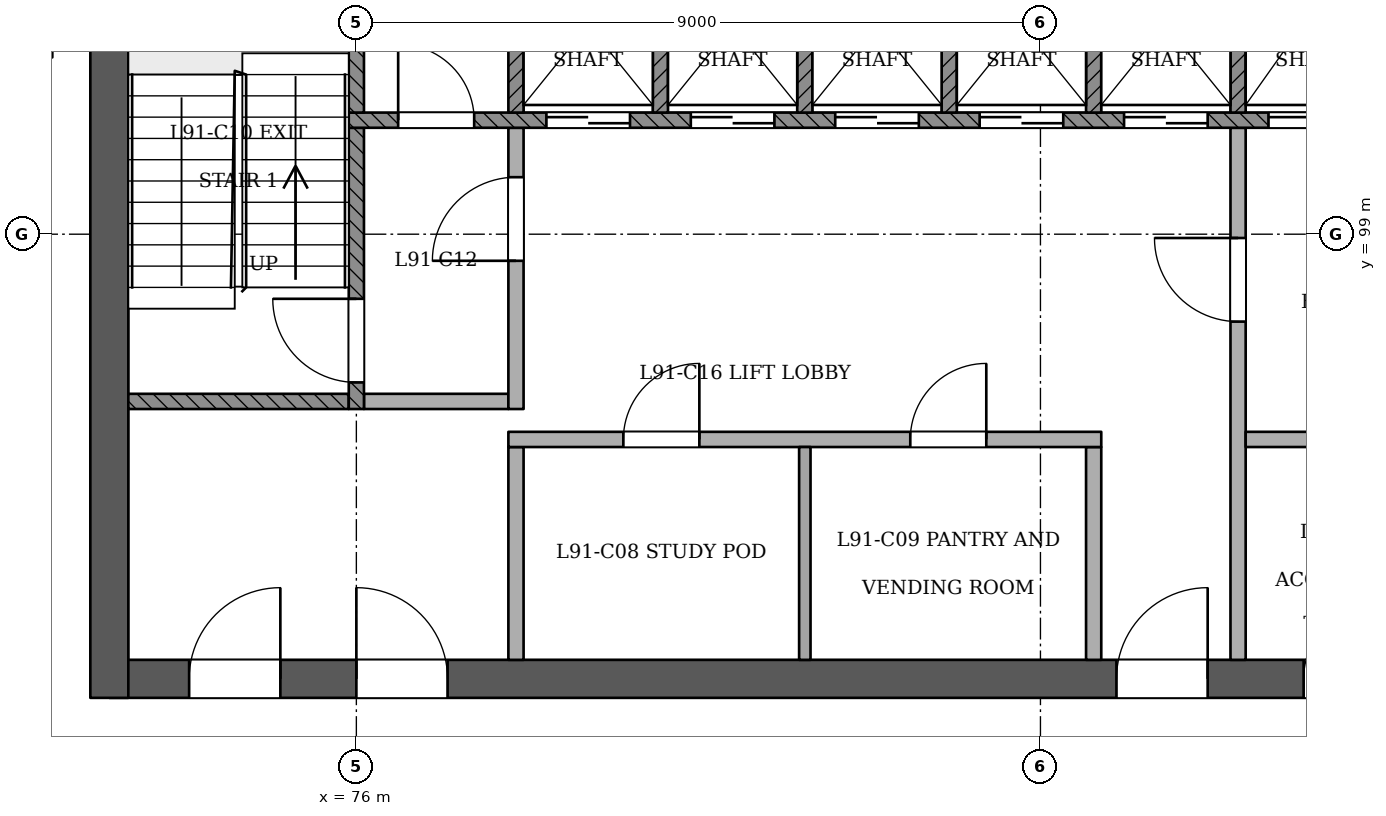
"""IFC4 building model, lengths in metres.
Left out: names, types, materials, properties, quantities, classifications, styles, units other than length and angle.
Written with IfcOpenShell. Run it as: python <this file> out.ifc"""

import sys

from ifc_helpers import new_model, si_unit, direction, frame, frame_2d, origin, place, context, subcontext, project, spatial, rectangle, extrude, element, fill, save


model = new_model("IFC4")
c1 = context("Model", 3, precision=1e-05, world=origin(), true_north=direction((0.0, 1.0)))
c2 = subcontext(c1, "Body", "Model", "MODEL_VIEW")
j1 = project(units=[si_unit("LENGTHUNIT", "METRE"), si_unit("PLANEANGLEUNIT", "RADIAN")], contexts=[c1])
p1 = place(None, origin())
s1 = spatial("IfcSite", under=j1, at=p1, CompositionType="ELEMENT")
p2 = place(p1, origin())
s2 = spatial("IfcBuilding", under=s1, at=p2, CompositionType="ELEMENT")
p3 = place(p2, frame((0.0, 0.0, 350.8)))
s3 = spatial("IfcBuildingStorey", under=s2, at=p3, CompositionType="ELEMENT", Elevation=350.8)
p4 = place(p3, frame((72.75, 93.15, 0.0), z_axis=(0.0, 0.0, 1.0), x_axis=(1.0, 0.0, 0.0)))
e1 = element("IfcWall", 1, at=p4, inside=s3, PredefinedType="SHEAR", context=c2, shape_type="SweptSolid", body=[
    extrude(rectangle(XDim=24.75, YDim=0.5, at=frame_2d((12.375, 0.0))), origin(), (0.0, 0.0, 1.0), 3.6),
])
p5 = place(p4, frame((1.05, 0.0, 0.0)))
e2 = element("IfcOpeningElement", 2, at=p5, cuts=e1, PredefinedType="OPENING", context=c2, shape_type="SweptSolid", body=[
    extrude(rectangle(XDim=1.2, YDim=2.1, at=frame_2d((0.6, 1.05))), frame((0.0, 0.26, 0.0), z_axis=(0.0, -1.0, 0.0), x_axis=(1.0, 0.0, 0.0)), (0.0, 0.0, 1.0), 0.521),
])
p6 = place(p4, frame((3.25, 0.0, 0.0)))
e3 = element("IfcOpeningElement", 3, at=p6, cuts=e1, PredefinedType="OPENING", context=c2, shape_type="SweptSolid", body=[
    extrude(rectangle(XDim=1.2, YDim=2.1, at=frame_2d((0.6, 1.05))), frame((0.0, 0.26, 0.0), z_axis=(0.0, -1.0, 0.0), x_axis=(1.0, 0.0, 0.0)), (0.0, 0.0, 1.0), 0.521),
])
p7 = place(p4, frame((13.25, 0.0, 0.0)))
e4 = element("IfcOpeningElement", 4, at=p7, cuts=e1, PredefinedType="OPENING", context=c2, shape_type="SweptSolid", body=[
    extrude(rectangle(XDim=1.2, YDim=2.1, at=frame_2d((0.6, 1.05))), frame((0.0, 0.26, 0.0), z_axis=(0.0, -1.0, 0.0), x_axis=(1.0, 0.0, 0.0)), (0.0, 0.0, 1.0), 0.521),
])
p8 = place(p4, frame((15.712, 0.0, 0.0)))
e5 = element("IfcOpeningElement", 5, at=p8, cuts=e1, PredefinedType="OPENING", context=c2, shape_type="SweptSolid", body=[
    extrude(rectangle(XDim=1.0, YDim=2.1, at=frame_2d((0.5, 1.05))), frame((0.0, 0.26, 0.0), z_axis=(0.0, -1.0, 0.0), x_axis=(1.0, 0.0, 0.0)), (0.0, 0.0, 1.0), 0.521),
])
p9 = place(p4, frame((18.15, 0.0, 0.0)))
e6 = element("IfcOpeningElement", 6, at=p9, cuts=e1, PredefinedType="OPENING", context=c2, shape_type="SweptSolid", body=[
    extrude(rectangle(XDim=1.0, YDim=2.1, at=frame_2d((0.5, 1.05))), frame((0.0, 0.26, 0.0), z_axis=(0.0, -1.0, 0.0), x_axis=(1.0, 0.0, 0.0)), (0.0, 0.0, 1.0), 0.521),
])
p10 = place(p4, frame((20.5, 0.0, 0.0)))
e7 = element("IfcOpeningElement", 7, at=p10, cuts=e1, PredefinedType="OPENING", context=c2, shape_type="SweptSolid", body=[
    extrude(rectangle(XDim=1.0, YDim=2.1, at=frame_2d((0.5, 1.05))), frame((0.0, 0.26, 0.0), z_axis=(0.0, -1.0, 0.0), x_axis=(1.0, 0.0, 0.0)), (0.0, 0.0, 1.0), 0.521),
])
p11 = place(p4, frame((22.788, 0.0, 0.0)))
e8 = element("IfcOpeningElement", 8, at=p11, cuts=e1, PredefinedType="OPENING", context=c2, shape_type="SweptSolid", body=[
    extrude(rectangle(XDim=1.0, YDim=2.1, at=frame_2d((0.5, 1.05))), frame((0.0, 0.26, 0.0), z_axis=(0.0, -1.0, 0.0), x_axis=(1.0, 0.0, 0.0)), (0.0, 0.0, 1.0), 0.521),
])
p12 = place(p3, frame((72.75, 103.65, 0.0), z_axis=(0.0, 0.0, 1.0), x_axis=(0.0, -1.0, 0.0)))
e9 = element("IfcWall", 9, at=p12, inside=s3, PredefinedType="SHEAR", context=c2, shape_type="SweptSolid", body=[
    extrude(rectangle(XDim=10.75, YDim=0.5, at=frame_2d((5.375, 0.0))), origin(), (0.0, 0.0, 1.0), 3.6),
])
p13 = place(p3, frame((78.1, 93.4, 0.0), z_axis=(0.0, 0.0, 1.0), x_axis=(0.0, 1.0, 0.0)))
e10 = element("IfcWall", 10, at=p13, inside=s3, PredefinedType="PARTITIONING", context=c2, shape_type="SweptSolid", body=[
    extrude(rectangle(XDim=2.8, YDim=0.2, at=frame_2d((1.4, 0.0))), origin(), (0.0, 0.0, 1.0), 3.2),
])
p14 = place(p3, frame((81.9, 93.4, 0.0), z_axis=(0.0, 0.0, 1.0), x_axis=(0.0, 1.0, 0.0)))
e11 = element("IfcWall", 11, at=p14, inside=s3, PredefinedType="PARTITIONING", context=c2, shape_type="SweptSolid", body=[
    extrude(rectangle(XDim=2.8, YDim=0.15, at=frame_2d((1.4, 0.0))), origin(), (0.0, 0.0, 1.0), 3.2),
])
p15 = place(p3, frame((85.7, 93.4, 0.0), z_axis=(0.0, 0.0, 1.0), x_axis=(0.0, 1.0, 0.0)))
e12 = element("IfcWall", 12, at=p15, inside=s3, PredefinedType="PARTITIONING", context=c2, shape_type="SweptSolid", body=[
    extrude(rectangle(XDim=2.8, YDim=0.2, at=frame_2d((1.4, 0.0))), origin(), (0.0, 0.0, 1.0), 3.2),
])
p16 = place(p3, frame((87.6, 93.4, 0.0), z_axis=(0.0, 0.0, 1.0), x_axis=(0.0, 1.0, 0.0)))
e13 = element("IfcWall", 13, at=p16, inside=s3, PredefinedType="PARTITIONING", context=c2, shape_type="SweptSolid", body=[
    extrude(rectangle(XDim=7.0, YDim=0.2, at=frame_2d((3.5, 0.0))), origin(), (0.0, 0.0, 1.0), 3.2),
])
p17 = place(p16, frame((4.45, 0.0, 0.0)))
e14 = element("IfcOpeningElement", 14, at=p17, cuts=e13, PredefinedType="OPENING", context=c2, shape_type="SweptSolid", body=[
    extrude(rectangle(XDim=1.1, YDim=2.1, at=frame_2d((0.55, 1.05))), frame((0.0, 0.11, 0.0), z_axis=(0.0, -1.0, 0.0), x_axis=(1.0, 0.0, 0.0)), (0.0, 0.0, 1.0), 0.221),
])
p18 = place(p3, frame((78.0, 96.3, 0.0), z_axis=(0.0, 0.0, 1.0), x_axis=(1.0, 0.0, 0.0)))
e15 = element("IfcWall", 15, at=p18, inside=s3, PredefinedType="PARTITIONING", context=c2, shape_type="SweptSolid", body=[
    extrude(rectangle(XDim=7.8, YDim=0.2, at=frame_2d((3.9, 0.0))), origin(), (0.0, 0.0, 1.0), 3.2),
])
p19 = place(p18, frame((1.512, 0.0, 0.0)))
e16 = element("IfcOpeningElement", 16, at=p19, cuts=e15, PredefinedType="OPENING", context=c2, shape_type="SweptSolid", body=[
    extrude(rectangle(XDim=1.0, YDim=2.1, at=frame_2d((0.5, 1.05))), frame((0.0, 0.11, 0.0), z_axis=(0.0, -1.0, 0.0), x_axis=(1.0, 0.0, 0.0)), (0.0, 0.0, 1.0), 0.221),
])
p20 = place(p18, frame((5.288, 0.0, 0.0)))
e17 = element("IfcOpeningElement", 17, at=p20, cuts=e15, PredefinedType="OPENING", context=c2, shape_type="SweptSolid", body=[
    extrude(rectangle(XDim=1.0, YDim=2.1, at=frame_2d((0.5, 1.05))), frame((0.0, 0.11, 0.0), z_axis=(0.0, -1.0, 0.0), x_axis=(1.0, 0.0, 0.0)), (0.0, 0.0, 1.0), 0.221),
])
p21 = place(p3, frame((87.7, 96.3, 0.0), z_axis=(0.0, 0.0, 1.0), x_axis=(1.0, 0.0, 0.0)))
e18 = element("IfcWall", 18, at=p21, inside=s3, PredefinedType="PARTITIONING", context=c2, shape_type="SweptSolid", body=[
    extrude(rectangle(XDim=3.6, YDim=0.2, at=frame_2d((1.8, 0.0))), origin(), (0.0, 0.0, 1.0), 3.2),
])
p22 = place(p3, frame((73.0, 96.8, 0.0), z_axis=(0.0, 0.0, 1.0), x_axis=(1.0, 0.0, 0.0)))
e19 = element("IfcWall", 19, at=p22, inside=s3, PredefinedType="SOLIDWALL", context=c2, shape_type="SweptSolid", body=[
    extrude(rectangle(XDim=2.9, YDim=0.2, at=frame_2d((1.45, 0.0))), origin(), (0.0, 0.0, 1.0), 3.2),
])
p23 = place(p3, frame((76.0, 96.7, 0.0), z_axis=(0.0, 0.0, 1.0), x_axis=(0.0, 1.0, 0.0)))
e20 = element("IfcWall", 20, at=p23, inside=s3, PredefinedType="SOLIDWALL", context=c2, shape_type="SweptSolid", body=[
    extrude(rectangle(XDim=3.7, YDim=0.2, at=frame_2d((1.85, 0.0))), origin(), (0.0, 0.0, 1.0), 3.2),
])
p24 = place(p23, frame((0.35, 0.0, 0.0)))
e21 = element("IfcOpeningElement", 21, at=p24, cuts=e20, PredefinedType="OPENING", context=c2, shape_type="SweptSolid", body=[
    extrude(rectangle(XDim=1.1, YDim=2.1, at=frame_2d((0.55, 1.05))), frame((0.0, 0.11, 0.0), z_axis=(0.0, -1.0, 0.0), x_axis=(1.0, 0.0, 0.0)), (0.0, 0.0, 1.0), 0.221),
])
p25 = place(p3, frame((76.1, 96.8, 0.0), z_axis=(0.0, 0.0, 1.0), x_axis=(1.0, 0.0, 0.0)))
e22 = element("IfcWall", 22, at=p25, inside=s3, PredefinedType="PARTITIONING", context=c2, shape_type="SweptSolid", body=[
    extrude(rectangle(XDim=1.9, YDim=0.2, at=frame_2d((0.95, 0.0))), origin(), (0.0, 0.0, 1.0), 3.2),
])
p26 = place(p3, frame((78.1, 96.7, 0.0), z_axis=(0.0, 0.0, 1.0), x_axis=(0.0, 1.0, 0.0)))
e23 = element("IfcWall", 23, at=p26, inside=s3, PredefinedType="PARTITIONING", context=c2, shape_type="SweptSolid", body=[
    extrude(rectangle(XDim=3.7, YDim=0.2, at=frame_2d((1.85, 0.0))), origin(), (0.0, 0.0, 1.0), 3.2),
])
p27 = place(p26, frame((1.95, 0.0, 0.0)))
e24 = element("IfcOpeningElement", 24, at=p27, cuts=e23, PredefinedType="OPENING", context=c2, shape_type="SweptSolid", body=[
    extrude(rectangle(XDim=1.1, YDim=2.1, at=frame_2d((0.55, 1.05))), frame((0.0, 0.11, 0.0), z_axis=(0.0, -1.0, 0.0), x_axis=(1.0, 0.0, 0.0)), (0.0, 0.0, 1.0), 0.221),
])
p28 = place(p3, frame((75.9, 100.5, 0.0), z_axis=(0.0, 0.0, 1.0), x_axis=(1.0, 0.0, 0.0)))
e25 = element("IfcWall", 25, at=p28, inside=s3, PredefinedType="SOLIDWALL", context=c2, shape_type="SweptSolid", body=[
    extrude(rectangle(XDim=18.2, YDim=0.2, at=frame_2d((9.1, 0.0))), origin(), (0.0, 0.0, 1.0), 3.2),
])
p29 = place(p28, frame((2.6, 0.0, 0.0)))
e26 = element("IfcOpeningElement", 26, at=p29, cuts=e25, PredefinedType="OPENING", context=c2, shape_type="SweptSolid", body=[
    extrude(rectangle(XDim=1.1, YDim=2.1, at=frame_2d((0.55, 1.05))), frame((0.0, 0.11, 0.0), z_axis=(0.0, -1.0, 0.0), x_axis=(1.0, 0.0, 0.0)), (0.0, 0.0, 1.0), 0.221),
])
p30 = place(p28, frame((4.5, 0.0, 0.0)))
e27 = element("IfcOpeningElement", 27, at=p30, cuts=e25, PredefinedType="OPENING", context=c2, shape_type="SweptSolid", body=[
    extrude(rectangle(XDim=1.1, YDim=2.1, at=frame_2d((0.55, 1.05))), frame((0.0, 0.11, 0.0), z_axis=(0.0, -1.0, 0.0), x_axis=(1.0, 0.0, 0.0)), (0.0, 0.0, 1.0), 0.221),
])
p31 = place(p28, frame((6.4, 0.0, 0.0)))
e28 = element("IfcOpeningElement", 28, at=p31, cuts=e25, PredefinedType="OPENING", context=c2, shape_type="SweptSolid", body=[
    extrude(rectangle(XDim=1.1, YDim=2.1, at=frame_2d((0.55, 1.05))), frame((0.0, 0.11, 0.0), z_axis=(0.0, -1.0, 0.0), x_axis=(1.0, 0.0, 0.0)), (0.0, 0.0, 1.0), 0.221),
])
p32 = place(p28, frame((8.3, 0.0, 0.0)))
e29 = element("IfcOpeningElement", 29, at=p32, cuts=e25, PredefinedType="OPENING", context=c2, shape_type="SweptSolid", body=[
    extrude(rectangle(XDim=1.1, YDim=2.1, at=frame_2d((0.55, 1.05))), frame((0.0, 0.11, 0.0), z_axis=(0.0, -1.0, 0.0), x_axis=(1.0, 0.0, 0.0)), (0.0, 0.0, 1.0), 0.221),
])
p33 = place(p28, frame((10.2, 0.0, 0.0)))
e30 = element("IfcOpeningElement", 30, at=p33, cuts=e25, PredefinedType="OPENING", context=c2, shape_type="SweptSolid", body=[
    extrude(rectangle(XDim=1.1, YDim=2.1, at=frame_2d((0.55, 1.05))), frame((0.0, 0.11, 0.0), z_axis=(0.0, -1.0, 0.0), x_axis=(1.0, 0.0, 0.0)), (0.0, 0.0, 1.0), 0.221),
])
p34 = place(p28, frame((12.1, 0.0, 0.0)))
e31 = element("IfcOpeningElement", 31, at=p34, cuts=e25, PredefinedType="OPENING", context=c2, shape_type="SweptSolid", body=[
    extrude(rectangle(XDim=1.1, YDim=2.1, at=frame_2d((0.55, 1.05))), frame((0.0, 0.11, 0.0), z_axis=(0.0, -1.0, 0.0), x_axis=(1.0, 0.0, 0.0)), (0.0, 0.0, 1.0), 0.221),
])
p35 = place(p28, frame((14.0, 0.0, 0.0)))
e32 = element("IfcOpeningElement", 32, at=p35, cuts=e25, PredefinedType="OPENING", context=c2, shape_type="SweptSolid", body=[
    extrude(rectangle(XDim=1.1, YDim=2.1, at=frame_2d((0.55, 1.05))), frame((0.0, 0.11, 0.0), z_axis=(0.0, -1.0, 0.0), x_axis=(1.0, 0.0, 0.0)), (0.0, 0.0, 1.0), 0.221),
])
p36 = place(p28, frame((0.65, 0.0, 0.0)))
e33 = element("IfcOpeningElement", 33, at=p36, cuts=e25, PredefinedType="OPENING", context=c2, shape_type="SweptSolid", body=[
    extrude(rectangle(XDim=1.0, YDim=2.1, at=frame_2d((0.5, 1.05))), frame((0.0, 0.11, 0.0), z_axis=(0.0, -1.0, 0.0), x_axis=(1.0, 0.0, 0.0)), (0.0, 0.0, 1.0), 0.221),
])
p37 = place(p28, frame((16.3, 0.0, 0.0)))
e34 = element("IfcOpeningElement", 34, at=p37, cuts=e25, PredefinedType="OPENING", context=c2, shape_type="SweptSolid", body=[
    extrude(rectangle(XDim=1.0, YDim=2.1, at=frame_2d((0.5, 1.05))), frame((0.0, 0.11, 0.0), z_axis=(0.0, -1.0, 0.0), x_axis=(1.0, 0.0, 0.0)), (0.0, 0.0, 1.0), 0.221),
])
for number, where, z_axis, x_axis in (
    (35, (76.0, 100.6, 0.0), (0.0, 0.0, 1.0), (0.0, 1.0, 0.0)),
    (36, (78.1, 100.6, 0.0), (0.0, 0.0, 1.0), (0.0, 1.0, 0.0)),
    (37, (80.0, 100.6, 0.0), (0.0, 0.0, 1.0), (0.0, 1.0, 0.0)),
    (38, (81.9, 100.6, 0.0), (0.0, 0.0, 1.0), (0.0, 1.0, 0.0)),
    (39, (83.8, 100.6, 0.0), (0.0, 0.0, 1.0), (0.0, 1.0, 0.0)),
    (40, (85.7, 100.6, 0.0), (0.0, 0.0, 1.0), (0.0, 1.0, 0.0)),
    (41, (87.6, 100.6, 0.0), (0.0, 0.0, 1.0), (0.0, 1.0, 0.0)),
):
    element("IfcWall", number, at=place(p3, frame(where, z_axis=z_axis, x_axis=x_axis)), inside=s3, PredefinedType="SOLIDWALL", context=c2, shape_type="SweptSolid", body=[
        extrude(rectangle(XDim=2.8, YDim=0.2, at=frame_2d((1.4, 0.0))), origin(), (0.0, 0.0, 1.0), 3.2),
    ])
p38 = place(p29, origin())
e42 = element("IfcDoor", 42, at=p38, inside=s3, OperationType="SLIDING_TO_RIGHT", PredefinedType="NOTDEFINED", context=c2, shape_type="SweptSolid", body=[
    extrude(rectangle(XDim=1.1, YDim=2.1, at=frame_2d((0.55, 1.05))), frame((0.0, 0.025, 0.0), z_axis=(0.0, -1.0, 0.0), x_axis=(1.0, 0.0, 0.0)), (0.0, 0.0, 1.0), 0.05),
])
fill(e26, e42)
p39 = place(p30, origin())
e43 = element("IfcDoor", 43, at=p39, inside=s3, OperationType="SLIDING_TO_LEFT", PredefinedType="NOTDEFINED", context=c2, shape_type="SweptSolid", body=[
    extrude(rectangle(XDim=1.1, YDim=2.1, at=frame_2d((0.55, 1.05))), frame((0.0, 0.025, 0.0), z_axis=(0.0, -1.0, 0.0), x_axis=(1.0, 0.0, 0.0)), (0.0, 0.0, 1.0), 0.05),
])
fill(e27, e43)
p40 = place(p31, origin())
e44 = element("IfcDoor", 44, at=p40, inside=s3, OperationType="SLIDING_TO_RIGHT", PredefinedType="NOTDEFINED", context=c2, shape_type="SweptSolid", body=[
    extrude(rectangle(XDim=1.1, YDim=2.1, at=frame_2d((0.55, 1.05))), frame((0.0, 0.025, 0.0), z_axis=(0.0, -1.0, 0.0), x_axis=(1.0, 0.0, 0.0)), (0.0, 0.0, 1.0), 0.05),
])
fill(e28, e44)
p41 = place(p32, origin())
e45 = element("IfcDoor", 45, at=p41, inside=s3, OperationType="SLIDING_TO_LEFT", PredefinedType="NOTDEFINED", context=c2, shape_type="SweptSolid", body=[
    extrude(rectangle(XDim=1.1, YDim=2.1, at=frame_2d((0.55, 1.05))), frame((0.0, 0.025, 0.0), z_axis=(0.0, -1.0, 0.0), x_axis=(1.0, 0.0, 0.0)), (0.0, 0.0, 1.0), 0.05),
])
fill(e29, e45)
p42 = place(p33, origin())
e46 = element("IfcDoor", 46, at=p42, inside=s3, OperationType="SLIDING_TO_RIGHT", PredefinedType="NOTDEFINED", context=c2, shape_type="SweptSolid", body=[
    extrude(rectangle(XDim=1.1, YDim=2.1, at=frame_2d((0.55, 1.05))), frame((0.0, 0.025, 0.0), z_axis=(0.0, -1.0, 0.0), x_axis=(1.0, 0.0, 0.0)), (0.0, 0.0, 1.0), 0.05),
])
fill(e30, e46)
p43 = place(p34, origin())
e47 = element("IfcDoor", 47, at=p43, inside=s3, OperationType="SLIDING_TO_RIGHT", PredefinedType="NOTDEFINED", context=c2, shape_type="SweptSolid", body=[
    extrude(rectangle(XDim=1.1, YDim=2.1, at=frame_2d((0.55, 1.05))), frame((0.0, 0.025, 0.0), z_axis=(0.0, -1.0, 0.0), x_axis=(1.0, 0.0, 0.0)), (0.0, 0.0, 1.0), 0.05),
])
fill(e31, e47)
p44 = place(p24, origin())
e48 = element("IfcDoor", 48, at=p44, inside=s3, OperationType="SINGLE_SWING_RIGHT", PredefinedType="NOTDEFINED", context=c2, shape_type="SweptSolid", body=[
    extrude(rectangle(XDim=1.1, YDim=2.1, at=frame_2d((0.55, 1.05))), frame((0.0, 0.025, 0.0), z_axis=(0.0, -1.0, 0.0), x_axis=(1.0, 0.0, 0.0)), (0.0, 0.0, 1.0), 0.05),
])
fill(e21, e48)
p45 = place(p27, origin())
e49 = element("IfcDoor", 49, at=p45, inside=s3, OperationType="SINGLE_SWING_LEFT", PredefinedType="NOTDEFINED", context=c2, shape_type="SweptSolid", body=[
    extrude(rectangle(XDim=1.1, YDim=2.1, at=frame_2d((0.55, 1.05))), frame((0.0, 0.025, 0.0), z_axis=(0.0, -1.0, 0.0), x_axis=(1.0, 0.0, 0.0)), (0.0, 0.0, 1.0), 0.05),
])
fill(e24, e49)
p46 = place(p17, origin())
e50 = element("IfcDoor", 50, at=p46, inside=s3, OperationType="SINGLE_SWING_RIGHT", PredefinedType="NOTDEFINED", context=c2, shape_type="SweptSolid", body=[
    extrude(rectangle(XDim=1.1, YDim=2.1, at=frame_2d((0.55, 1.05))), frame((0.0, 0.025, 0.0), z_axis=(0.0, -1.0, 0.0), x_axis=(1.0, 0.0, 0.0)), (0.0, 0.0, 1.0), 0.05),
])
fill(e14, e50)
p47 = place(p5, origin())
e51 = element("IfcDoor", 51, at=p47, inside=s3, OperationType="SINGLE_SWING_RIGHT", PredefinedType="NOTDEFINED", context=c2, shape_type="SweptSolid", body=[
    extrude(rectangle(XDim=1.2, YDim=2.1, at=frame_2d((0.6, 1.05))), frame((0.0, 0.025, 0.0), z_axis=(0.0, -1.0, 0.0), x_axis=(1.0, 0.0, 0.0)), (0.0, 0.0, 1.0), 0.05),
])
fill(e2, e51)
p48 = place(p6, origin())
e52 = element("IfcDoor", 52, at=p48, inside=s3, OperationType="SINGLE_SWING_LEFT", PredefinedType="NOTDEFINED", context=c2, shape_type="SweptSolid", body=[
    extrude(rectangle(XDim=1.2, YDim=2.1, at=frame_2d((0.6, 1.05))), frame((0.0, 0.025, 0.0), z_axis=(0.0, -1.0, 0.0), x_axis=(1.0, 0.0, 0.0)), (0.0, 0.0, 1.0), 0.05),
])
fill(e3, e52)
p49 = place(p7, origin())
e53 = element("IfcDoor", 53, at=p49, inside=s3, OperationType="SINGLE_SWING_RIGHT", PredefinedType="NOTDEFINED", context=c2, shape_type="SweptSolid", body=[
    extrude(rectangle(XDim=1.2, YDim=2.1, at=frame_2d((0.6, 1.05))), frame((0.0, 0.025, 0.0), z_axis=(0.0, -1.0, 0.0), x_axis=(1.0, 0.0, 0.0)), (0.0, 0.0, 1.0), 0.05),
])
fill(e4, e53)
p50 = place(p36, origin())
e54 = element("IfcDoor", 54, at=p50, inside=s3, OperationType="SINGLE_SWING_LEFT", PredefinedType="NOTDEFINED", context=c2, shape_type="SweptSolid", body=[
    extrude(rectangle(XDim=1.0, YDim=2.1, at=frame_2d((0.5, 1.05))), frame((0.0, 0.025, 0.0), z_axis=(0.0, -1.0, 0.0), x_axis=(1.0, 0.0, 0.0)), (0.0, 0.0, 1.0), 0.05),
])
fill(e33, e54)
p51 = place(p8, origin())
e55 = element("IfcDoor", 55, at=p51, inside=s3, OperationType="SINGLE_SWING_RIGHT", PredefinedType="NOTDEFINED", context=c2, shape_type="SweptSolid", body=[
    extrude(rectangle(XDim=1.0, YDim=2.1, at=frame_2d((0.5, 1.05))), frame((0.0, 0.025, 0.0), z_axis=(0.0, -1.0, 0.0), x_axis=(1.0, 0.0, 0.0)), (0.0, 0.0, 1.0), 0.05),
])
fill(e5, e55)
p52 = place(p19, origin())
e56 = element("IfcDoor", 56, at=p52, inside=s3, OperationType="SINGLE_SWING_RIGHT", PredefinedType="NOTDEFINED", context=c2, shape_type="SweptSolid", body=[
    extrude(rectangle(XDim=1.0, YDim=2.1, at=frame_2d((0.5, 1.05))), frame((0.0, 0.025, 0.0), z_axis=(0.0, -1.0, 0.0), x_axis=(1.0, 0.0, 0.0)), (0.0, 0.0, 1.0), 0.05),
])
fill(e16, e56)
p53 = place(p20, origin())
e57 = element("IfcDoor", 57, at=p53, inside=s3, OperationType="SINGLE_SWING_RIGHT", PredefinedType="NOTDEFINED", context=c2, shape_type="SweptSolid", body=[
    extrude(rectangle(XDim=1.0, YDim=2.1, at=frame_2d((0.5, 1.05))), frame((0.0, 0.025, 0.0), z_axis=(0.0, -1.0, 0.0), x_axis=(1.0, 0.0, 0.0)), (0.0, 0.0, 1.0), 0.05),
])
fill(e17, e57)
save(model, sys.argv[1])
